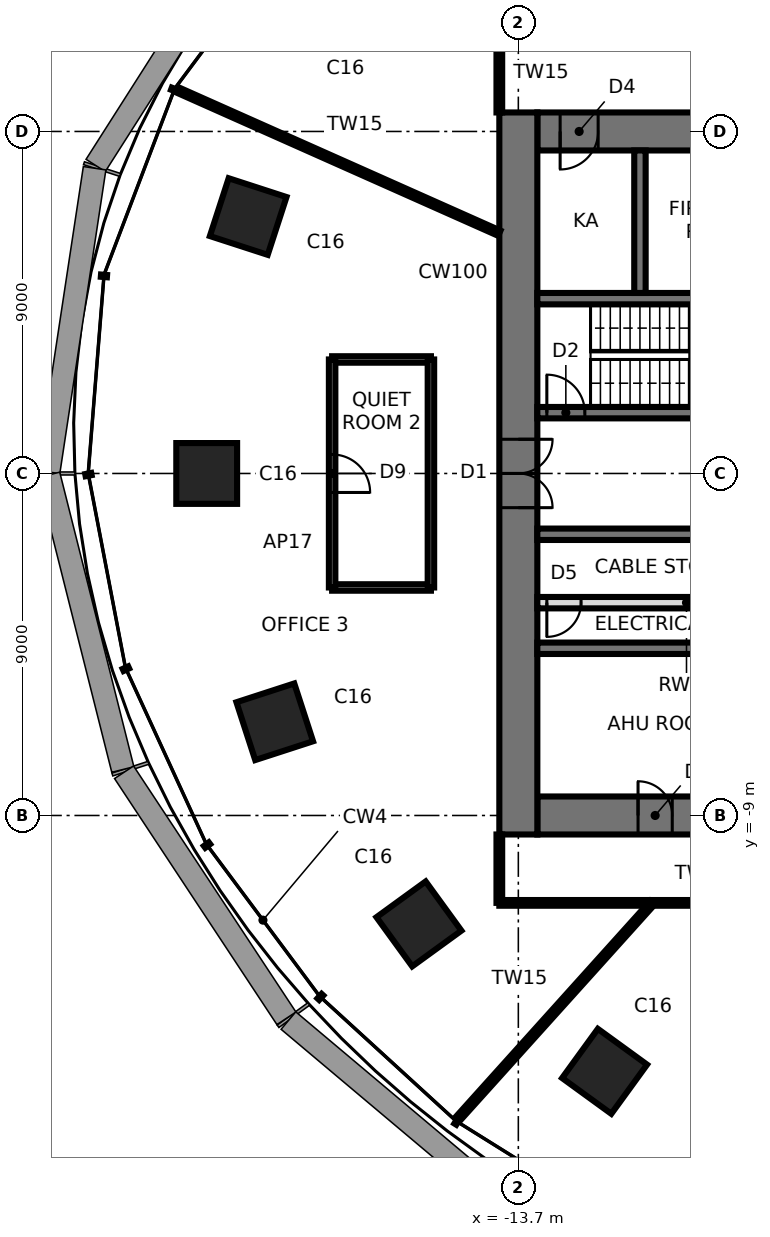
"""IFC4 building model, lengths in metres.
Left out: names, types, materials, properties, quantities, classifications, styles, units other than length and angle.
Written with IfcOpenShell. Run it as: python <this file> out.ifc"""

import sys

from ifc_helpers import new_model, si_unit, direction, frame, frame_2d, origin, origin_2d, place, context, subcontext, project, spatial, rectangle, extrude, element, fill, save


model = new_model("IFC4")
c1 = context("Model", 3, precision=1e-05, world=origin(), true_north=direction((0.0, 1.0)))
c2 = subcontext(c1, "Body", "Model", "MODEL_VIEW")
j1 = project(units=[si_unit("LENGTHUNIT", "METRE"), si_unit("PLANEANGLEUNIT", "RADIAN")], contexts=[c1])
p1 = place(None, origin())
s1 = spatial("IfcSite", under=j1, at=p1, CompositionType="ELEMENT")
p2 = place(p1, origin())
s2 = spatial("IfcBuilding", under=s1, at=p2, CompositionType="ELEMENT")
p3 = place(p2, frame((0.0, 0.0, 127.5)))
s3 = spatial("IfcBuildingStorey", under=s2, at=p3, CompositionType="ELEMENT", Elevation=127.5)
for number, where, z_axis, x_axis in (
    (1, (-20.808, 6.761, 0.0), (0.0, 0.0, 1.0), (-0.951, 0.309, 0.0)),
    (2, (-21.9, 0.0, 0.0), (0.0, 0.0, 1.0), (-1.0, 0.0, 0.0)),
    (3, (-20.109, -6.534, 0.0), (0.0, 0.0, 1.0), (-0.951, -0.309, 0.0)),
    (4, (-16.315, -11.854, 0.0), (0.0, 0.0, 1.0), (-0.809, -0.588, 0.0)),
    (5, (-11.43, -15.733, 0.0), (0.0, 0.0, 1.0), (-0.588, -0.809, 0.0)),
):
    element("IfcColumn", number, at=place(p3, frame(where, z_axis=z_axis, x_axis=x_axis)), inside=s3, PredefinedType="COLUMN", context=c2, shape_type="SweptSolid", body=[
        extrude(rectangle(XDim=1.6, YDim=1.6, at=origin_2d()), origin(), (0.0, 0.0, 1.0), 3.9),
    ])
p4 = place(p3, frame((-13.2, -9.0, 0.0), z_axis=(0.0, 0.0, 1.0), x_axis=(1.0, 0.0, 0.0)))
e6 = element("IfcWall", 6, at=p4, inside=s3, PredefinedType="SHEAR", context=c2, shape_type="SweptSolid", body=[
    extrude(rectangle(XDim=26.4, YDim=1.0, at=frame_2d((13.2, 0.0))), origin(), (0.0, 0.0, 1.0), 3.9),
])
p5 = place(p4, frame((2.65, 0.0, 0.0)))
e7 = element("IfcOpeningElement", 7, at=p5, cuts=e6, PredefinedType="OPENING", context=c2, shape_type="SweptSolid", body=[
    extrude(rectangle(XDim=0.9, YDim=2.1, at=frame_2d((0.45, 1.05))), frame((0.0, 0.51, 0.0), z_axis=(0.0, -1.0, 0.0), x_axis=(1.0, 0.0, 0.0)), (0.0, 0.0, 1.0), 1.02),
])
p6 = place(p4, frame((9.5, 0.0, 0.0)))
e8 = element("IfcOpeningElement", 8, at=p6, cuts=e6, PredefinedType="OPENING", context=c2, shape_type="SweptSolid", body=[
    extrude(rectangle(XDim=0.9, YDim=2.1, at=frame_2d((0.45, 1.05))), frame((0.0, 0.51, 0.0), z_axis=(0.0, -1.0, 0.0), x_axis=(1.0, 0.0, 0.0)), (0.0, 0.0, 1.0), 1.02),
])
p7 = place(p4, frame((16.0, 0.0, 0.0)))
e9 = element("IfcOpeningElement", 9, at=p7, cuts=e6, PredefinedType="OPENING", context=c2, shape_type="SweptSolid", body=[
    extrude(rectangle(XDim=0.9, YDim=2.1, at=frame_2d((0.45, 1.05))), frame((0.0, 0.51, 0.0), z_axis=(0.0, -1.0, 0.0), x_axis=(1.0, 0.0, 0.0)), (0.0, 0.0, 1.0), 1.02),
])
p8 = place(p4, frame((22.85, 0.0, 0.0)))
e10 = element("IfcOpeningElement", 10, at=p8, cuts=e6, PredefinedType="OPENING", context=c2, shape_type="SweptSolid", body=[
    extrude(rectangle(XDim=0.9, YDim=2.1, at=frame_2d((0.45, 1.05))), frame((0.0, 0.51, 0.0), z_axis=(0.0, -1.0, 0.0), x_axis=(1.0, 0.0, 0.0)), (0.0, 0.0, 1.0), 1.02),
])
p9 = place(p3, frame((13.2, 9.0, 0.0), z_axis=(0.0, 0.0, 1.0), x_axis=(-1.0, 0.0, 0.0)))
e11 = element("IfcWall", 11, at=p9, inside=s3, PredefinedType="SHEAR", context=c2, shape_type="SweptSolid", body=[
    extrude(rectangle(XDim=26.4, YDim=1.0, at=frame_2d((13.2, 0.0))), origin(), (0.0, 0.0, 1.0), 3.9),
])
p10 = place(p9, frame((2.65, 0.0, 0.0)))
e12 = element("IfcOpeningElement", 12, at=p10, cuts=e11, PredefinedType="OPENING", context=c2, shape_type="SweptSolid", body=[
    extrude(rectangle(XDim=0.9, YDim=2.1, at=frame_2d((0.45, 1.05))), frame((0.0, 0.51, 0.0), z_axis=(0.0, -1.0, 0.0), x_axis=(1.0, 0.0, 0.0)), (0.0, 0.0, 1.0), 1.02),
])
p11 = place(p9, frame((9.5, 0.0, 0.0)))
e13 = element("IfcOpeningElement", 13, at=p11, cuts=e11, PredefinedType="OPENING", context=c2, shape_type="SweptSolid", body=[
    extrude(rectangle(XDim=0.9, YDim=2.1, at=frame_2d((0.45, 1.05))), frame((0.0, 0.51, 0.0), z_axis=(0.0, -1.0, 0.0), x_axis=(1.0, 0.0, 0.0)), (0.0, 0.0, 1.0), 1.02),
])
p12 = place(p9, frame((16.0, 0.0, 0.0)))
e14 = element("IfcOpeningElement", 14, at=p12, cuts=e11, PredefinedType="OPENING", context=c2, shape_type="SweptSolid", body=[
    extrude(rectangle(XDim=0.9, YDim=2.1, at=frame_2d((0.45, 1.05))), frame((0.0, 0.51, 0.0), z_axis=(0.0, -1.0, 0.0), x_axis=(1.0, 0.0, 0.0)), (0.0, 0.0, 1.0), 1.02),
])
p13 = place(p9, frame((21.25, 0.0, 0.0)))
e15 = element("IfcOpeningElement", 15, at=p13, cuts=e11, PredefinedType="OPENING", context=c2, shape_type="SweptSolid", body=[
    extrude(rectangle(XDim=0.9, YDim=2.1, at=frame_2d((0.45, 1.05))), frame((0.0, 0.51, 0.0), z_axis=(0.0, -1.0, 0.0), x_axis=(1.0, 0.0, 0.0)), (0.0, 0.0, 1.0), 1.02),
])
p14 = place(p9, frame((24.8, 0.0, 0.0)))
e16 = element("IfcOpeningElement", 16, at=p14, cuts=e11, PredefinedType="OPENING", context=c2, shape_type="SweptSolid", body=[
    extrude(rectangle(XDim=1.0, YDim=2.1, at=frame_2d((0.5, 1.05))), frame((0.0, 0.51, 0.0), z_axis=(0.0, -1.0, 0.0), x_axis=(1.0, 0.0, 0.0)), (0.0, 0.0, 1.0), 1.02),
])
p15 = place(p3, frame((-13.7, 9.5, 0.0), z_axis=(0.0, 0.0, 1.0), x_axis=(0.0, -1.0, 0.0)))
e17 = element("IfcWall", 17, at=p15, inside=s3, PredefinedType="SHEAR", context=c2, shape_type="SweptSolid", body=[
    extrude(rectangle(XDim=19.0, YDim=1.0, at=frame_2d((9.5, 0.0))), origin(), (0.0, 0.0, 1.0), 3.9),
])
p16 = place(p15, frame((8.6, 0.0, 0.0)))
e18 = element("IfcOpeningElement", 18, at=p16, cuts=e17, PredefinedType="OPENING", context=c2, shape_type="SweptSolid", body=[
    extrude(rectangle(XDim=1.8, YDim=2.4, at=frame_2d((0.9, 1.2))), frame((0.0, 0.51, 0.0), z_axis=(0.0, -1.0, 0.0), x_axis=(1.0, 0.0, 0.0)), (0.0, 0.0, 1.0), 1.02),
])
p17 = place(p3, frame((-13.2, 1.6, 0.0), z_axis=(0.0, 0.0, 1.0), x_axis=(1.0, 0.0, 0.0)))
e19 = element("IfcWall", 19, at=p17, inside=s3, PredefinedType="SHEAR", context=c2, shape_type="SweptSolid", body=[
    extrude(rectangle(XDim=26.4, YDim=0.3, at=frame_2d((13.2, 0.0))), origin(), (0.0, 0.0, 1.0), 3.9),
])
p18 = place(p17, frame((0.25, 0.0, 0.0)))
e20 = element("IfcOpeningElement", 20, at=p18, cuts=e19, PredefinedType="OPENING", context=c2, shape_type="SweptSolid", body=[
    extrude(rectangle(XDim=1.0, YDim=2.1, at=frame_2d((0.5, 1.05))), frame((0.0, 0.16, 0.0), z_axis=(0.0, -1.0, 0.0), x_axis=(1.0, 0.0, 0.0)), (0.0, 0.0, 1.0), 0.32),
])
p19 = place(p17, frame((20.25, 0.0, 0.0)))
e21 = element("IfcOpeningElement", 21, at=p19, cuts=e19, PredefinedType="OPENING", context=c2, shape_type="SweptSolid", body=[
    extrude(rectangle(XDim=1.5, YDim=2.4, at=frame_2d((0.75, 1.2))), frame((0.0, 0.16, 0.0), z_axis=(0.0, -1.0, 0.0), x_axis=(1.0, 0.0, 0.0)), (0.0, 0.0, 1.0), 0.32),
])
p20 = place(p17, frame((7.55, 0.0, 0.0)))
e22 = element("IfcOpeningElement", 22, at=p20, cuts=e19, PredefinedType="OPENING", context=c2, shape_type="SweptSolid", body=[
    extrude(rectangle(XDim=0.9, YDim=2.1, at=frame_2d((0.45, 1.05))), frame((0.0, 0.16, 0.0), z_axis=(0.0, -1.0, 0.0), x_axis=(1.0, 0.0, 0.0)), (0.0, 0.0, 1.0), 0.32),
])
p21 = place(p17, frame((10.15, 0.0, 0.0)))
e23 = element("IfcOpeningElement", 23, at=p21, cuts=e19, PredefinedType="OPENING", context=c2, shape_type="SweptSolid", body=[
    extrude(rectangle(XDim=0.9, YDim=2.1, at=frame_2d((0.45, 1.05))), frame((0.0, 0.16, 0.0), z_axis=(0.0, -1.0, 0.0), x_axis=(1.0, 0.0, 0.0)), (0.0, 0.0, 1.0), 0.32),
])
p22 = place(p17, frame((12.75, 0.0, 0.0)))
e24 = element("IfcOpeningElement", 24, at=p22, cuts=e19, PredefinedType="OPENING", context=c2, shape_type="SweptSolid", body=[
    extrude(rectangle(XDim=0.9, YDim=2.1, at=frame_2d((0.45, 1.05))), frame((0.0, 0.16, 0.0), z_axis=(0.0, -1.0, 0.0), x_axis=(1.0, 0.0, 0.0)), (0.0, 0.0, 1.0), 0.32),
])
p23 = place(p17, frame((24.15, 0.0, 0.0)))
e25 = element("IfcOpeningElement", 25, at=p23, cuts=e19, PredefinedType="OPENING", context=c2, shape_type="SweptSolid", body=[
    extrude(rectangle(XDim=0.9, YDim=2.1, at=frame_2d((0.45, 1.05))), frame((0.0, 0.16, 0.0), z_axis=(0.0, -1.0, 0.0), x_axis=(1.0, 0.0, 0.0)), (0.0, 0.0, 1.0), 0.32),
])
p24 = place(p3, frame((-13.2, -1.6, 0.0), z_axis=(0.0, 0.0, 1.0), x_axis=(1.0, 0.0, 0.0)))
e26 = element("IfcWall", 26, at=p24, inside=s3, PredefinedType="SHEAR", context=c2, shape_type="SweptSolid", body=[
    extrude(rectangle(XDim=26.4, YDim=0.3, at=frame_2d((13.2, 0.0))), origin(), (0.0, 0.0, 1.0), 3.9),
])
p25 = place(p24, frame((25.15, 0.0, 0.0)))
e27 = element("IfcOpeningElement", 27, at=p25, cuts=e26, PredefinedType="OPENING", context=c2, shape_type="SweptSolid", body=[
    extrude(rectangle(XDim=1.0, YDim=2.1, at=frame_2d((0.5, 1.05))), frame((0.0, 0.16, 0.0), z_axis=(0.0, -1.0, 0.0), x_axis=(1.0, 0.0, 0.0)), (0.0, 0.0, 1.0), 0.32),
])
p26 = place(p24, frame((7.45, 0.0, 0.0)))
e28 = element("IfcOpeningElement", 28, at=p26, cuts=e26, PredefinedType="OPENING", context=c2, shape_type="SweptSolid", body=[
    extrude(rectangle(XDim=1.1, YDim=2.3, at=frame_2d((0.55, 1.15))), frame((0.0, 0.16, 0.0), z_axis=(0.0, -1.0, 0.0), x_axis=(1.0, 0.0, 0.0)), (0.0, 0.0, 1.0), 0.32),
])
p27 = place(p24, frame((10.05, 0.0, 0.0)))
e29 = element("IfcOpeningElement", 29, at=p27, cuts=e26, PredefinedType="OPENING", context=c2, shape_type="SweptSolid", body=[
    extrude(rectangle(XDim=1.1, YDim=2.3, at=frame_2d((0.55, 1.15))), frame((0.0, 0.16, 0.0), z_axis=(0.0, -1.0, 0.0), x_axis=(1.0, 0.0, 0.0)), (0.0, 0.0, 1.0), 0.32),
])
p28 = place(p24, frame((12.65, 0.0, 0.0)))
e30 = element("IfcOpeningElement", 30, at=p28, cuts=e26, PredefinedType="OPENING", context=c2, shape_type="SweptSolid", body=[
    extrude(rectangle(XDim=1.1, YDim=2.3, at=frame_2d((0.55, 1.15))), frame((0.0, 0.16, 0.0), z_axis=(0.0, -1.0, 0.0), x_axis=(1.0, 0.0, 0.0)), (0.0, 0.0, 1.0), 0.32),
])
p29 = place(p24, frame((15.25, 0.0, 0.0)))
e31 = element("IfcOpeningElement", 31, at=p29, cuts=e26, PredefinedType="OPENING", context=c2, shape_type="SweptSolid", body=[
    extrude(rectangle(XDim=1.1, YDim=2.3, at=frame_2d((0.55, 1.15))), frame((0.0, 0.16, 0.0), z_axis=(0.0, -1.0, 0.0), x_axis=(1.0, 0.0, 0.0)), (0.0, 0.0, 1.0), 0.32),
])
p30 = place(p24, frame((17.85, 0.0, 0.0)))
e32 = element("IfcOpeningElement", 32, at=p30, cuts=e26, PredefinedType="OPENING", context=c2, shape_type="SweptSolid", body=[
    extrude(rectangle(XDim=1.1, YDim=2.3, at=frame_2d((0.55, 1.15))), frame((0.0, 0.16, 0.0), z_axis=(0.0, -1.0, 0.0), x_axis=(1.0, 0.0, 0.0)), (0.0, 0.0, 1.0), 0.32),
])
p31 = place(p24, frame((5.55, 0.0, 0.0)))
e33 = element("IfcOpeningElement", 33, at=p31, cuts=e26, PredefinedType="OPENING", context=c2, shape_type="SweptSolid", body=[
    extrude(rectangle(XDim=0.9, YDim=2.1, at=frame_2d((0.45, 1.05))), frame((0.0, 0.16, 0.0), z_axis=(0.0, -1.0, 0.0), x_axis=(1.0, 0.0, 0.0)), (0.0, 0.0, 1.0), 0.32),
])
for number, where, z_axis, x_axis in (
    (34, (-13.2, 4.6, 0.0), (0.0, 0.0, 1.0), (1.0, 0.0, 0.0)),
    (35, (-13.2, -4.6, 0.0), (0.0, 0.0, 1.0), (1.0, 0.0, 0.0)),
):
    element("IfcWall", number, at=place(p3, frame(where, z_axis=z_axis, x_axis=x_axis)), inside=s3, PredefinedType="SHEAR", context=c2, shape_type="SweptSolid", body=[
        extrude(rectangle(XDim=26.4, YDim=0.3, at=frame_2d((13.2, 0.0))), origin(), (0.0, 0.0, 1.0), 3.9),
    ])
p32 = place(p3, frame((-10.5, 4.75, 0.0), z_axis=(0.0, 0.0, 1.0), x_axis=(0.0, 1.0, 0.0)))
e36 = element("IfcWall", 36, at=p32, inside=s3, PredefinedType="SHEAR", context=c2, shape_type="SweptSolid", body=[
    extrude(rectangle(XDim=3.75, YDim=0.3, at=frame_2d((1.875, 0.0))), origin(), (0.0, 0.0, 1.0), 3.9),
])
p33 = place(p3, frame((-13.2, -3.4, 0.0), z_axis=(0.0, 0.0, 1.0), x_axis=(1.0, 0.0, 0.0)))
e37 = element("IfcWall", 37, at=p33, inside=s3, PredefinedType="SOLIDWALL", context=c2, shape_type="SweptSolid", body=[
    extrude(rectangle(XDim=6.55, YDim=0.3, at=frame_2d((3.275, 0.0))), origin(), (0.0, 0.0, 1.0), 3.74),
])
p34 = place(p33, frame((0.25, 0.0, 0.0)))
e38 = element("IfcOpeningElement", 38, at=p34, cuts=e37, PredefinedType="OPENING", context=c2, shape_type="SweptSolid", body=[
    extrude(rectangle(XDim=0.9, YDim=2.1, at=frame_2d((0.45, 1.05))), frame((0.0, 0.16, 0.0), z_axis=(0.0, -1.0, 0.0), x_axis=(1.0, 0.0, 0.0)), (0.0, 0.0, 1.0), 0.32),
])
p35 = place(p3, frame((-16.0, -3.0, 0.0), z_axis=(0.0, 0.0, 1.0), x_axis=(-1.0, 0.0, 0.0)))
e39 = element("IfcWall", 39, at=p35, inside=s3, PredefinedType="PARTITIONING", context=c2, shape_type="SweptSolid", body=[
    extrude(rectangle(XDim=2.6, YDim=0.17, at=frame_2d((1.3, 0.0))), origin(), (0.0, 0.0, 1.0), 3.74),
])
p36 = place(p3, frame((-14.2, -9.5, 0.0), z_axis=(0.0, 0.0, 1.0), x_axis=(0.0, -1.0, 0.0)))
e40 = element("IfcWall", 40, at=p36, inside=s3, PredefinedType="PARTITIONING", context=c2, shape_type="SweptSolid", body=[
    extrude(rectangle(XDim=1.8, YDim=0.15, at=frame_2d((0.9, 0.0))), origin(), (0.0, 0.0, 1.0), 3.74),
])
p37 = place(p3, frame((-15.288, -16.979, 0.0), z_axis=(0.0, 0.0, 1.0), x_axis=(0.66913947005, 0.743136844478, 0.0)))
e41 = element("IfcWall", 41, at=p37, inside=s3, PredefinedType="PARTITIONING", context=c2, shape_type="SweptSolid", body=[
    extrude(rectangle(XDim=7.641, YDim=0.15, at=frame_2d((3.821, 0.0))), origin(), (0.0, 0.0, 1.0), 3.74),
])
p38 = place(p3, frame((-14.2, -11.3, 0.0), z_axis=(0.0, 0.0, 1.0), x_axis=(1.0, 0.0, 0.0)))
e42 = element("IfcWall", 42, at=p38, inside=s3, PredefinedType="PARTITIONING", context=c2, shape_type="SweptSolid", body=[
    extrude(rectangle(XDim=10.7, YDim=0.15, at=frame_2d((5.35, 0.0))), origin(), (0.0, 0.0, 1.0), 3.74),
])
p39 = place(p3, frame((-14.2, 11.3, 0.0), z_axis=(0.0, 0.0, 1.0), x_axis=(0.0, -1.0, 0.0)))
e43 = element("IfcWall", 43, at=p39, inside=s3, PredefinedType="PARTITIONING", context=c2, shape_type="SweptSolid", body=[
    extrude(rectangle(XDim=1.8, YDim=0.15, at=frame_2d((0.9, 0.0))), origin(), (0.0, 0.0, 1.0), 3.74),
])
p40 = place(p3, frame((-14.2, 6.322, 0.0), z_axis=(0.0, 0.0, 1.0), x_axis=(-0.913544220381, 0.406739421999, 0.0)))
e44 = element("IfcWall", 44, at=p40, inside=s3, PredefinedType="PARTITIONING", context=c2, shape_type="SweptSolid", body=[
    extrude(rectangle(XDim=9.271, YDim=0.15, at=frame_2d((4.636, 0.0))), origin(), (0.0, 0.0, 1.0), 3.74),
])
p41 = place(p3, frame((-18.6, 3.0, 0.0), z_axis=(0.0, 0.0, 1.0), x_axis=(1.0, 0.0, 0.0)))
e45 = element("IfcWall", 45, at=p41, inside=s3, PredefinedType="PARTITIONING", context=c2, shape_type="SweptSolid", body=[
    extrude(rectangle(XDim=2.6, YDim=0.17, at=frame_2d((1.3, 0.0))), origin(), (0.0, 0.0, 1.0), 3.74),
])
p42 = place(p3, frame((-18.6, -3.0, 0.0), z_axis=(0.0, 0.0, 1.0), x_axis=(0.0, 1.0, 0.0)))
e46 = element("IfcWall", 46, at=p42, inside=s3, PredefinedType="PARTITIONING", context=c2, shape_type="SweptSolid", body=[
    extrude(rectangle(XDim=6.0, YDim=0.17, at=frame_2d((3.0, 0.0))), origin(), (0.0, 0.0, 1.0), 3.74),
])
p43 = place(p42, frame((2.5, 0.0, 0.0)))
e47 = element("IfcOpeningElement", 47, at=p43, cuts=e46, PredefinedType="OPENING", context=c2, shape_type="SweptSolid", body=[
    extrude(rectangle(XDim=1.0, YDim=2.4, at=frame_2d((0.5, 1.2))), frame((0.0, 0.095, 0.0), z_axis=(0.0, -1.0, 0.0), x_axis=(1.0, 0.0, 0.0)), (0.0, 0.0, 1.0), 0.19),
])
p44 = place(p3, frame((-16.0, 3.0, 0.0), z_axis=(0.0, 0.0, 1.0), x_axis=(0.0, -1.0, 0.0)))
e48 = element("IfcWall", 48, at=p44, inside=s3, PredefinedType="PARTITIONING", context=c2, shape_type="SweptSolid", body=[
    extrude(rectangle(XDim=6.0, YDim=0.17, at=frame_2d((3.0, 0.0))), origin(), (0.0, 0.0, 1.0), 3.74),
])
p45 = place(p16, origin())
e49 = element("IfcDoor", 49, at=p45, inside=s3, OperationType="DOUBLE_DOOR_SINGLE_SWING", PredefinedType="DOOR", context=c2, shape_type="SweptSolid", body=[
    extrude(rectangle(XDim=1.72, YDim=2.36, at=frame_2d((0.9, 1.18))), frame((0.0, 0.025, 0.0), z_axis=(0.0, -1.0, 0.0), x_axis=(1.0, 0.0, 0.0)), (0.0, 0.0, 1.0), 0.05),
    extrude(rectangle(XDim=0.04, YDim=2.4, at=frame_2d((0.02, 1.2))), frame((0.0, 0.25, 0.0), z_axis=(0.0, -1.0, 0.0), x_axis=(1.0, 0.0, 0.0)), (0.0, 0.0, 1.0), 0.5),
    extrude(rectangle(XDim=0.04, YDim=2.4, at=frame_2d((1.78, 1.2))), frame((0.0, 0.25, 0.0), z_axis=(0.0, -1.0, 0.0), x_axis=(1.0, 0.0, 0.0)), (0.0, 0.0, 1.0), 0.5),
    extrude(rectangle(XDim=1.72, YDim=0.04, at=frame_2d((0.9, 2.38))), frame((0.0, 0.25, 0.0), z_axis=(0.0, -1.0, 0.0), x_axis=(1.0, 0.0, 0.0)), (0.0, 0.0, 1.0), 0.5),
])
fill(e18, e49)
p46 = place(p18, origin())
e50 = element("IfcDoor", 50, at=p46, inside=s3, OperationType="SINGLE_SWING_LEFT", PredefinedType="DOOR", context=c2, shape_type="SweptSolid", body=[
    extrude(rectangle(XDim=1.0, YDim=2.1, at=frame_2d((0.5, 1.05))), frame((0.0, 0.025, 0.0), z_axis=(0.0, -1.0, 0.0), x_axis=(1.0, 0.0, 0.0)), (0.0, 0.0, 1.0), 0.05),
])
fill(e20, e50)
p47 = place(p14, origin())
e51 = element("IfcDoor", 51, at=p47, inside=s3, OperationType="SINGLE_SWING_RIGHT", PredefinedType="DOOR", context=c2, shape_type="SweptSolid", body=[
    extrude(rectangle(XDim=0.92, YDim=2.06, at=frame_2d((0.5, 1.03))), frame((0.0, 0.025, 0.0), z_axis=(0.0, -1.0, 0.0), x_axis=(1.0, 0.0, 0.0)), (0.0, 0.0, 1.0), 0.05),
    extrude(rectangle(XDim=0.04, YDim=2.1, at=frame_2d((0.02, 1.05))), frame((0.0, 0.25, 0.0), z_axis=(0.0, -1.0, 0.0), x_axis=(1.0, 0.0, 0.0)), (0.0, 0.0, 1.0), 0.5),
    extrude(rectangle(XDim=0.04, YDim=2.1, at=frame_2d((0.98, 1.05))), frame((0.0, 0.25, 0.0), z_axis=(0.0, -1.0, 0.0), x_axis=(1.0, 0.0, 0.0)), (0.0, 0.0, 1.0), 0.5),
    extrude(rectangle(XDim=0.92, YDim=0.04, at=frame_2d((0.5, 2.08))), frame((0.0, 0.25, 0.0), z_axis=(0.0, -1.0, 0.0), x_axis=(1.0, 0.0, 0.0)), (0.0, 0.0, 1.0), 0.5),
])
fill(e16, e51)
p48 = place(p5, origin())
e52 = element("IfcDoor", 52, at=p48, inside=s3, OperationType="SINGLE_SWING_LEFT", PredefinedType="DOOR", context=c2, shape_type="SweptSolid", body=[
    extrude(rectangle(XDim=0.82, YDim=2.06, at=frame_2d((0.45, 1.03))), frame((0.0, 0.025, 0.0), z_axis=(0.0, -1.0, 0.0), x_axis=(1.0, 0.0, 0.0)), (0.0, 0.0, 1.0), 0.05),
    extrude(rectangle(XDim=0.04, YDim=2.1, at=frame_2d((0.02, 1.05))), frame((0.0, 0.25, 0.0), z_axis=(0.0, -1.0, 0.0), x_axis=(1.0, 0.0, 0.0)), (0.0, 0.0, 1.0), 0.5),
    extrude(rectangle(XDim=0.04, YDim=2.1, at=frame_2d((0.88, 1.05))), frame((0.0, 0.25, 0.0), z_axis=(0.0, -1.0, 0.0), x_axis=(1.0, 0.0, 0.0)), (0.0, 0.0, 1.0), 0.5),
    extrude(rectangle(XDim=0.82, YDim=0.04, at=frame_2d((0.45, 2.08))), frame((0.0, 0.25, 0.0), z_axis=(0.0, -1.0, 0.0), x_axis=(1.0, 0.0, 0.0)), (0.0, 0.0, 1.0), 0.5),
])
fill(e7, e52)
p49 = place(p34, frame((0.9, 0.0, 0.0), z_axis=(0.0, 0.0, 1.0), x_axis=(-1.0, 0.0, 0.0)))
e53 = element("IfcDoor", 53, at=p49, inside=s3, OperationType="SINGLE_SWING_RIGHT", PredefinedType="DOOR", context=c2, shape_type="SweptSolid", body=[
    extrude(rectangle(XDim=0.9, YDim=2.1, at=frame_2d((0.45, 1.05))), frame((0.0, 0.025, 0.0), z_axis=(0.0, -1.0, 0.0), x_axis=(1.0, 0.0, 0.0)), (0.0, 0.0, 1.0), 0.05),
])
fill(e38, e53)
p50 = place(p43, frame((1.0, 0.0, 0.0), z_axis=(0.0, 0.0, 1.0), x_axis=(-1.0, 0.0, 0.0)))
e54 = element("IfcDoor", 54, at=p50, inside=s3, OperationType="SINGLE_SWING_RIGHT", PredefinedType="DOOR", context=c2, shape_type="SweptSolid", body=[
    extrude(rectangle(XDim=1.0, YDim=2.4, at=frame_2d((0.5, 1.2))), frame((0.0, 0.025, 0.0), z_axis=(0.0, -1.0, 0.0), x_axis=(1.0, 0.0, 0.0)), (0.0, 0.0, 1.0), 0.05),
])
fill(e47, e54)
save(model, sys.argv[1])
